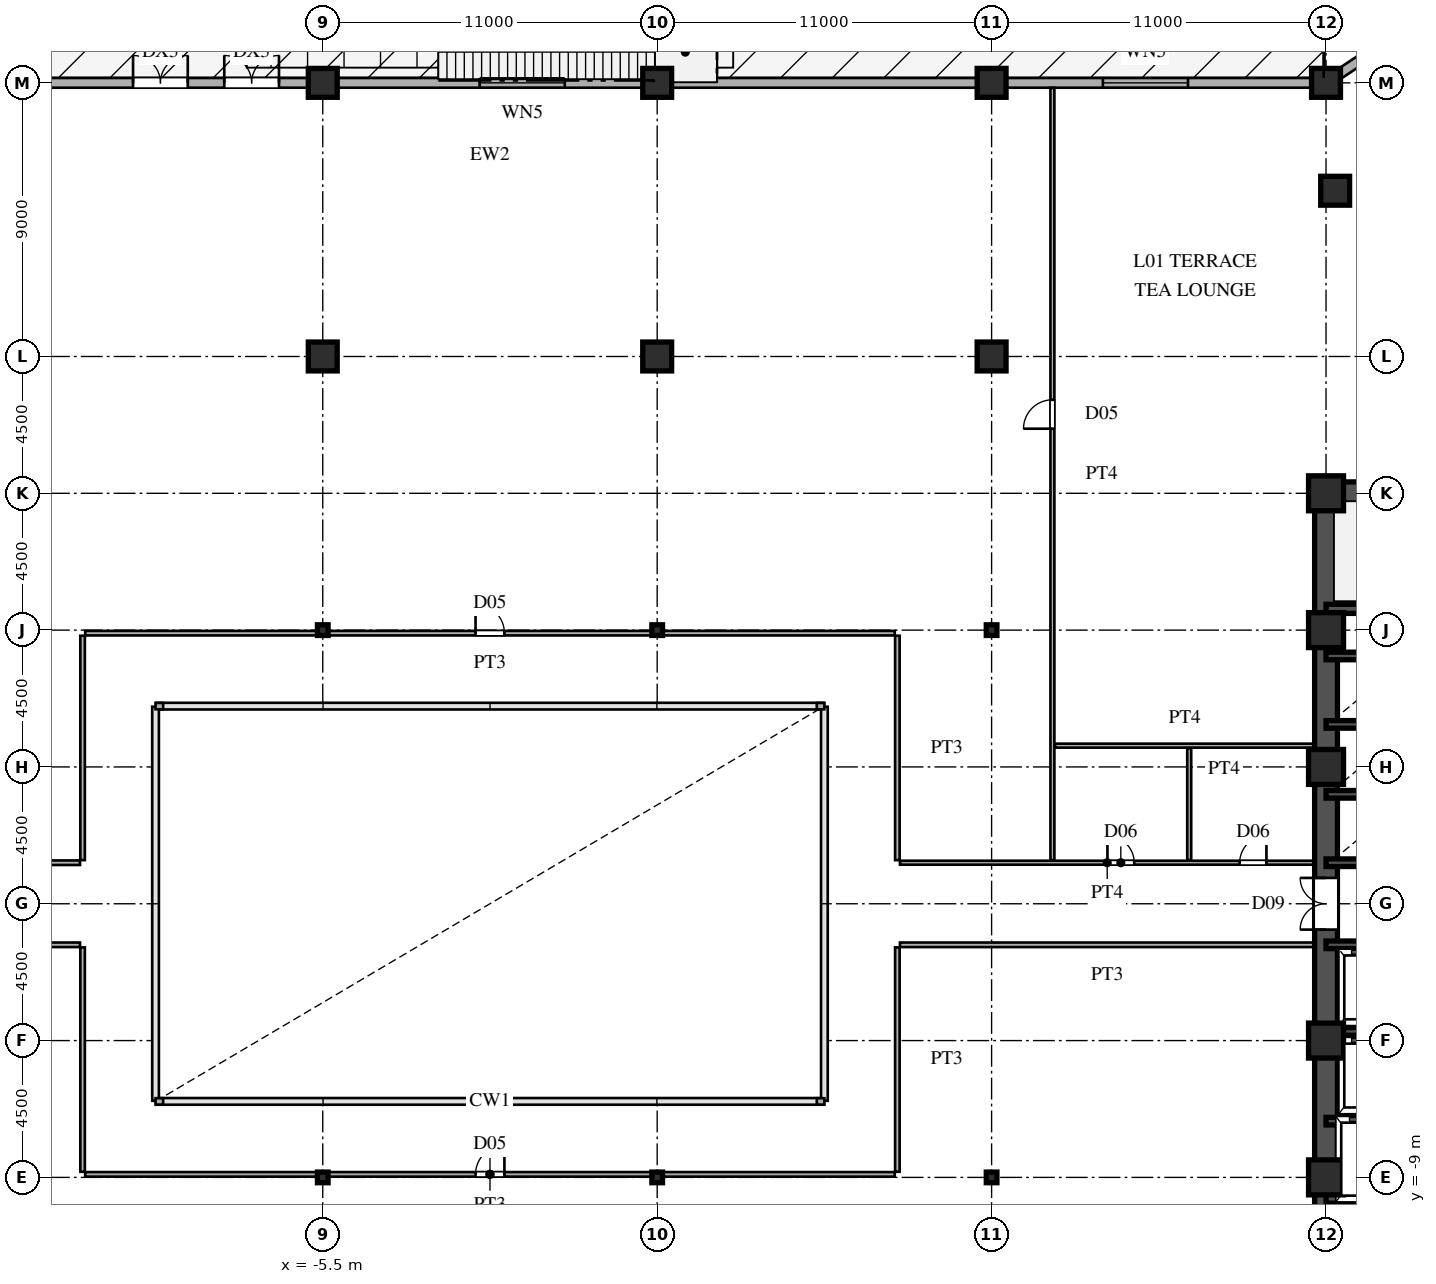
"""IFC4 building model, lengths in metres.
Left out: names, types, materials, properties, quantities, classifications, styles, units other than length and angle.
Written with IfcOpenShell. Run it as: python <this file> out.ifc"""

import sys

from ifc_helpers import new_model, si_unit, direction, frame, frame_2d, origin, origin_2d, place, context, subcontext, project, spatial, rectangle, hollow_rectangle, i_section, extrude, source, transform, mapped, element, fill, save


model = new_model("IFC4")
c1 = context("Model", 3, precision=1e-05, world=origin(), true_north=direction((0.0, 1.0)))
c2 = subcontext(c1, "Body", "Model", "MODEL_VIEW")
j1 = project(units=[si_unit("LENGTHUNIT", "METRE"), si_unit("PLANEANGLEUNIT", "RADIAN")], contexts=[c1])
p1 = place(None, origin())
s1 = spatial("IfcSite", under=j1, at=p1, CompositionType="ELEMENT")
p2 = place(p1, origin())
s2 = spatial("IfcBuilding", under=s1, at=p2, CompositionType="ELEMENT")
p3 = place(p2, frame((0.0, 0.0, 5.4)))
s3 = spatial("IfcBuildingStorey", under=s2, at=p3, CompositionType="ELEMENT", Elevation=5.4)
m1 = source(origin(), c2, "Body", "SweptSolid", [
    extrude(hollow_rectangle(XDim=1.15, YDim=1.15, WallThickness=0.048, at=origin_2d()), origin(), (0.0, 0.0, 1.0), 4.5),
])
for number, where, z_axis, x_axis in (
    (1, (27.5, -9.0, 0.0), (0.0, 0.0, 1.0), (1.0, 0.0, 0.0)),
    (2, (27.5, -4.5, 0.0), (0.0, 0.0, 1.0), (1.0, 0.0, 0.0)),
    (3, (27.5, 4.5, 0.0), (0.0, 0.0, 1.0), (1.0, 0.0, 0.0)),
    (4, (27.5, 9.0, 0.0), (0.0, 0.0, 1.0), (1.0, 0.0, 0.0)),
    (5, (27.5, 13.5, 0.0), (0.0, 0.0, 1.0), (1.0, 0.0, 0.0)),
):
    element("IfcColumn", number, at=place(p3, frame(where, z_axis=z_axis, x_axis=x_axis)), inside=s3, PredefinedType="COLUMN", context=c2, shape_type="MappedRepresentation", body=[
        mapped(m1, transform((0.0, 0.0, 0.0), scale=1.0)),
    ])
m2 = source(origin(), c2, "Body", "SweptSolid", [
    extrude(rectangle(XDim=0.95, YDim=0.95, at=origin_2d()), origin(), (0.0, 0.0, 1.0), 4.5),
])
for number, where, z_axis, x_axis in (
    (6, (27.5, 27.0, 0.0), (0.0, 0.0, 1.0), (1.0, 0.0, 0.0)),
    (7, (27.8, 23.451, 0.0), (0.0, 0.0, 1.0), (1.0, 0.0, 0.0)),
):
    element("IfcColumn", number, at=place(p3, frame(where, z_axis=z_axis, x_axis=x_axis)), inside=s3, PredefinedType="COLUMN", context=c2, shape_type="MappedRepresentation", body=[
        mapped(m2, transform((0.0, 0.0, 0.0), scale=1.0)),
    ])
m3 = source(origin(), c2, "Body", "SweptSolid", [
    extrude(i_section(OverallWidth=0.35, OverallDepth=0.35, WebThickness=0.012, FlangeThickness=0.019, at=origin_2d()), origin(), (0.0, 0.0, 1.0), 4.5),
])
for number, where, z_axis, x_axis in (
    (8, (-5.5, -9.0, 0.0), (0.0, 0.0, 1.0), (1.0, 0.0, 0.0)),
    (9, (-5.5, 9.0, 0.0), (0.0, 0.0, 1.0), (1.0, 0.0, 0.0)),
):
    element("IfcColumn", number, at=place(p3, frame(where, z_axis=z_axis, x_axis=x_axis)), inside=s3, PredefinedType="COLUMN", context=c2, shape_type="MappedRepresentation", body=[
        mapped(m3, transform((0.0, 0.0, 0.0), scale=1.0)),
    ])
for number, where, z_axis, x_axis in (
    (10, (-5.5, 18.0, 0.0), (0.0, 0.0, 1.0), (1.0, 0.0, 0.0)),
    (11, (-5.5, 27.0, 0.0), (0.0, 0.0, 1.0), (1.0, 0.0, 0.0)),
):
    element("IfcColumn", number, at=place(p3, frame(where, z_axis=z_axis, x_axis=x_axis)), inside=s3, PredefinedType="COLUMN", context=c2, shape_type="MappedRepresentation", body=[
        mapped(m2, transform((0.0, 0.0, 0.0), scale=1.0)),
    ])
for number, where, z_axis, x_axis in (
    (12, (5.5, -9.0, 0.0), (0.0, 0.0, 1.0), (1.0, 0.0, 0.0)),
    (13, (5.5, 9.0, 0.0), (0.0, 0.0, 1.0), (1.0, 0.0, 0.0)),
):
    element("IfcColumn", number, at=place(p3, frame(where, z_axis=z_axis, x_axis=x_axis)), inside=s3, PredefinedType="COLUMN", context=c2, shape_type="MappedRepresentation", body=[
        mapped(m3, transform((0.0, 0.0, 0.0), scale=1.0)),
    ])
for number, where, z_axis, x_axis in (
    (14, (5.5, 18.0, 0.0), (0.0, 0.0, 1.0), (1.0, 0.0, 0.0)),
    (15, (5.5, 27.0, 0.0), (0.0, 0.0, 1.0), (1.0, 0.0, 0.0)),
):
    element("IfcColumn", number, at=place(p3, frame(where, z_axis=z_axis, x_axis=x_axis)), inside=s3, PredefinedType="COLUMN", context=c2, shape_type="MappedRepresentation", body=[
        mapped(m2, transform((0.0, 0.0, 0.0), scale=1.0)),
    ])
for number, where, z_axis, x_axis in (
    (16, (16.5, -9.0, 0.0), (0.0, 0.0, 1.0), (1.0, 0.0, 0.0)),
    (17, (16.5, 9.0, 0.0), (0.0, 0.0, 1.0), (1.0, 0.0, 0.0)),
):
    element("IfcColumn", number, at=place(p3, frame(where, z_axis=z_axis, x_axis=x_axis)), inside=s3, PredefinedType="COLUMN", context=c2, shape_type="MappedRepresentation", body=[
        mapped(m3, transform((0.0, 0.0, 0.0), scale=1.0)),
    ])
for number, where, z_axis, x_axis in (
    (18, (16.5, 18.0, 0.0), (0.0, 0.0, 1.0), (1.0, 0.0, 0.0)),
    (19, (16.5, 27.0, 0.0), (0.0, 0.0, 1.0), (1.0, 0.0, 0.0)),
):
    element("IfcColumn", number, at=place(p3, frame(where, z_axis=z_axis, x_axis=x_axis)), inside=s3, PredefinedType="COLUMN", context=c2, shape_type="MappedRepresentation", body=[
        mapped(m2, transform((0.0, 0.0, 0.0), scale=1.0)),
    ])
p4 = place(p3, frame((30.467, 28.978, 0.0), z_axis=(0.0, 0.0, 1.0), x_axis=(-0.832071600484, -0.554668235676, 0.0)))
e20 = element("IfcWall", 20, at=p4, inside=s3, PredefinedType="SOLIDWALL", context=c2, shape_type="SweptSolid", body=[
    extrude(rectangle(XDim=3.526, YDim=0.32, at=frame_2d((1.763, 0.0))), origin(), (0.0, 0.0, 1.0), 4.22),
])
p5 = place(p3, frame((27.46, 27.0, 0.0), z_axis=(0.0, 0.0, 1.0), x_axis=(-1.0, 0.0, 0.0)))
e21 = element("IfcWall", 21, at=p5, inside=s3, PredefinedType="SOLIDWALL", context=c2, shape_type="SweptSolid", body=[
    extrude(rectangle(XDim=54.92, YDim=0.32, at=frame_2d((27.46, 0.0))), origin(), (0.0, 0.0, 1.0), 3.42),
])
p6 = place(p5, frame((34.4, 0.0, 0.0)))
e22 = element("IfcOpeningElement", 22, at=p6, cuts=e21, PredefinedType="OPENING", context=c2, shape_type="SweptSolid", body=[
    extrude(rectangle(XDim=1.8, YDim=2.3, at=frame_2d((0.9, 1.15))), frame((0.0, 0.17, 0.0), z_axis=(0.0, -1.0, 0.0), x_axis=(1.0, 0.0, 0.0)), (0.0, 0.0, 1.0), 0.34),
])
p7 = place(p5, frame((37.4, 0.0, 0.0)))
e23 = element("IfcOpeningElement", 23, at=p7, cuts=e21, PredefinedType="OPENING", context=c2, shape_type="SweptSolid", body=[
    extrude(rectangle(XDim=1.8, YDim=2.3, at=frame_2d((0.9, 1.15))), frame((0.0, 0.17, 0.0), z_axis=(0.0, -1.0, 0.0), x_axis=(1.0, 0.0, 0.0)), (0.0, 0.0, 1.0), 0.34),
])
p8 = place(p5, frame((4.5, 0.0, 0.8)))
e24 = element("IfcOpeningElement", 24, at=p8, cuts=e21, PredefinedType="OPENING", context=c2, shape_type="SweptSolid", body=[
    extrude(rectangle(XDim=2.8, YDim=2.1, at=frame_2d((1.4, 1.05))), frame((0.0, 0.17, 0.0), z_axis=(0.0, -1.0, 0.0), x_axis=(1.0, 0.0, 0.0)), (0.0, 0.0, 1.0), 0.34),
])
p9 = place(p5, frame((25.0, 0.0, 0.8)))
e25 = element("IfcOpeningElement", 25, at=p9, cuts=e21, PredefinedType="OPENING", context=c2, shape_type="SweptSolid", body=[
    extrude(rectangle(XDim=2.8, YDim=2.1, at=frame_2d((1.4, 1.05))), frame((0.0, 0.17, 0.0), z_axis=(0.0, -1.0, 0.0), x_axis=(1.0, 0.0, 0.0)), (0.0, 0.0, 1.0), 0.34),
])
p10 = place(p5, frame((46.42, 0.0, 0.8)))
e26 = element("IfcOpeningElement", 26, at=p10, cuts=e21, PredefinedType="OPENING", context=c2, shape_type="SweptSolid", body=[
    extrude(rectangle(XDim=2.8, YDim=2.1, at=frame_2d((1.4, 1.05))), frame((0.0, 0.17, 0.0), z_axis=(0.0, -1.0, 0.0), x_axis=(1.0, 0.0, 0.0)), (0.0, 0.0, 1.0), 0.34),
])
for number, where, z_axis, x_axis in (
    (27, (-11.0, -6.5, 0.0), (0.0, 0.0, 1.0), (1.0, 0.0, 0.0)),
    (28, (11.0, -6.5, 0.0), (0.0, 0.0, 1.0), (-1.0, 0.0, 0.0)),
    (29, (11.0, 6.5, 0.0), (0.0, 0.0, 1.0), (-1.0, 0.0, 0.0)),
    (30, (-11.0, 6.5, 0.0), (0.0, 0.0, 1.0), (1.0, 0.0, 0.0)),
):
    element("IfcWall", number, at=place(p3, frame(where, z_axis=z_axis, x_axis=x_axis)), inside=s3, PredefinedType="SOLIDWALL", context=c2, shape_type="SweptSolid", body=[
        extrude(rectangle(XDim=0.25, YDim=0.21, at=frame_2d((0.125, 0.0))), origin(), (0.0, 0.0, 1.0), 4.22),
    ])
for number, where, z_axis, x_axis in (
    (31, (27.5, -13.5, 0.0), (0.0, 0.0, 1.0), (0.0, 1.0, 0.0)),
    (32, (27.5, 1.3, 0.0), (0.0, 0.0, 1.0), (0.0, 1.0, 0.0)),
):
    element("IfcWall", number, at=place(p3, frame(where, z_axis=z_axis, x_axis=x_axis)), inside=s3, PredefinedType="SHEAR", context=c2, shape_type="SweptSolid", body=[
        extrude(rectangle(XDim=12.2, YDim=0.75, at=frame_2d((6.1, 0.0))), origin(), (0.0, 0.0, 1.0), 4.22),
    ])
p11 = place(p3, frame((27.5, -1.3, 0.0), z_axis=(0.0, 0.0, 1.0), x_axis=(0.0, 1.0, 0.0)))
e33 = element("IfcWall", 33, at=p11, inside=s3, PredefinedType="SHEAR", context=c2, shape_type="SweptSolid", body=[
    extrude(rectangle(XDim=2.6, YDim=0.75, at=frame_2d((1.3, 0.0))), origin(), (0.0, 0.0, 1.0), 4.22),
])
p12 = place(p11, frame((0.45, 0.0, 0.0)))
e34 = element("IfcOpeningElement", 34, at=p12, cuts=e33, PredefinedType="OPENING", context=c2, shape_type="SweptSolid", body=[
    extrude(rectangle(XDim=1.7, YDim=2.35, at=frame_2d((0.85, 1.175))), frame((0.0, 0.385, 0.0), z_axis=(0.0, -1.0, 0.0), x_axis=(1.0, 0.0, 0.0)), (0.0, 0.0, 1.0), 0.77),
])
p13 = place(p3, frame((27.5, 13.5, 0.0), z_axis=(0.0, 0.0, 1.0), x_axis=(1.0, 0.0, 0.0)))
e35 = element("IfcWall", 35, at=p13, inside=s3, PredefinedType="SHEAR", context=c2, shape_type="SweptSolid", body=[
    extrude(rectangle(XDim=9.0, YDim=0.75, at=frame_2d((4.5, 0.0))), origin(), (0.0, 0.0, 1.0), 4.22),
])
p14 = place(p3, frame((27.5, -9.7, 0.0), z_axis=(0.0, 0.0, 1.0), x_axis=(1.0, 0.0, 0.0)))
e36 = element("IfcWall", 36, at=p14, inside=s3, PredefinedType="SHEAR", context=c2, shape_type="SweptSolid", body=[
    extrude(rectangle(XDim=9.0, YDim=0.3, at=frame_2d((4.5, 0.0))), origin(), (0.0, 0.0, 1.0), 4.22),
])
p15 = place(p14, frame((7.3, 0.0, 0.0)))
e37 = element("IfcOpeningElement", 37, at=p15, cuts=e36, PredefinedType="OPENING", context=c2, shape_type="SweptSolid", body=[
    extrude(rectangle(XDim=1.1, YDim=2.2, at=frame_2d((0.55, 1.1))), frame((0.0, 0.16, 0.0), z_axis=(0.0, -1.0, 0.0), x_axis=(1.0, 0.0, 0.0)), (0.0, 0.0, 1.0), 0.32),
])
p16 = place(p3, frame((27.5, 9.7, 0.0), z_axis=(0.0, 0.0, 1.0), x_axis=(1.0, 0.0, 0.0)))
e38 = element("IfcWall", 38, at=p16, inside=s3, PredefinedType="SHEAR", context=c2, shape_type="SweptSolid", body=[
    extrude(rectangle(XDim=9.0, YDim=0.3, at=frame_2d((4.5, 0.0))), origin(), (0.0, 0.0, 1.0), 4.22),
])
p17 = place(p16, frame((7.3, 0.0, 0.0)))
e39 = element("IfcOpeningElement", 39, at=p17, cuts=e38, PredefinedType="OPENING", context=c2, shape_type="SweptSolid", body=[
    extrude(rectangle(XDim=1.1, YDim=2.2, at=frame_2d((0.55, 1.1))), frame((0.0, 0.16, 0.0), z_axis=(0.0, -1.0, 0.0), x_axis=(1.0, 0.0, 0.0)), (0.0, 0.0, 1.0), 0.32),
])
for number, where, z_axis, x_axis in (
    (40, (27.5, -7.15, 0.0), (0.0, 0.0, 1.0), (1.0, 0.0, 0.0)),
    (41, (27.5, -4.2, 0.0), (0.0, 0.0, 1.0), (1.0, 0.0, 0.0)),
    (42, (27.5, -1.35, 0.0), (0.0, 0.0, 1.0), (1.0, 0.0, 0.0)),
    (43, (27.5, 1.35, 0.0), (0.0, 0.0, 1.0), (1.0, 0.0, 0.0)),
    (44, (27.5, 3.6, 0.0), (0.0, 0.0, 1.0), (1.0, 0.0, 0.0)),
    (45, (27.5, 5.9, 0.0), (0.0, 0.0, 1.0), (1.0, 0.0, 0.0)),
    (46, (27.5, 8.15, 0.0), (0.0, 0.0, 1.0), (1.0, 0.0, 0.0)),
):
    element("IfcWall", number, at=place(p3, frame(where, z_axis=z_axis, x_axis=x_axis)), inside=s3, PredefinedType="SHEAR", context=c2, shape_type="SweptSolid", body=[
        extrude(rectangle(XDim=2.8, YDim=0.25, at=frame_2d((1.4, 0.0))), origin(), (0.0, 0.0, 1.0), 4.22),
    ])
p18 = place(p3, frame((-13.315, -8.9, 0.0), z_axis=(0.0, 0.0, 1.0), x_axis=(1.0, 0.0, 0.0)))
e47 = element("IfcWall", 47, at=p18, inside=s3, PredefinedType="PARTITIONING", context=c2, shape_type="SweptSolid", body=[
    extrude(rectangle(XDim=26.63, YDim=0.15, at=frame_2d((13.315, 0.0))), origin(), (0.0, 0.0, 1.0), 3.42),
])
p19 = place(p18, frame((12.84, 0.0, 0.0)))
e48 = element("IfcOpeningElement", 48, at=p19, cuts=e47, PredefinedType="OPENING", context=c2, shape_type="SweptSolid", body=[
    extrude(rectangle(XDim=0.95, YDim=2.15, at=frame_2d((0.475, 1.075))), frame((0.0, 0.085, 0.0), z_axis=(0.0, -1.0, 0.0), x_axis=(1.0, 0.0, 0.0)), (0.0, 0.0, 1.0), 0.17),
])
for number, where, z_axis, x_axis in (
    (49, (-27.12, -1.35, 0.0), (0.0, 0.0, 1.0), (1.0, 0.0, 0.0)),
    (50, (13.485, -1.35, 0.0), (0.0, 0.0, 1.0), (1.0, 0.0, 0.0)),
    (51, (-27.12, 1.35, 0.0), (0.0, 0.0, 1.0), (1.0, 0.0, 0.0)),
):
    element("IfcWall", number, at=place(p3, frame(where, z_axis=z_axis, x_axis=x_axis)), inside=s3, PredefinedType="PARTITIONING", context=c2, shape_type="SweptSolid", body=[
        extrude(rectangle(XDim=13.635, YDim=0.15, at=frame_2d((6.817, 0.0))), origin(), (0.0, 0.0, 1.0), 4.22),
    ])
p20 = place(p3, frame((13.485, 1.35, 0.0), z_axis=(0.0, 0.0, 1.0), x_axis=(1.0, 0.0, 0.0)))
e52 = element("IfcWall", 52, at=p20, inside=s3, PredefinedType="PARTITIONING", context=c2, shape_type="SweptSolid", body=[
    extrude(rectangle(XDim=13.635, YDim=0.13, at=frame_2d((6.817, 0.0))), origin(), (0.0, 0.0, 1.0), 4.22),
])
p21 = place(p20, frame((6.825, 0.0, 0.0)))
e53 = element("IfcOpeningElement", 53, at=p21, cuts=e52, PredefinedType="OPENING", context=c2, shape_type="SweptSolid", body=[
    extrude(rectangle(XDim=0.88, YDim=2.1, at=frame_2d((0.44, 1.05))), frame((0.0, 0.075, 0.0), z_axis=(0.0, -1.0, 0.0), x_axis=(1.0, 0.0, 0.0)), (0.0, 0.0, 1.0), 0.15),
])
p22 = place(p20, frame((11.175, 0.0, 0.0)))
e54 = element("IfcOpeningElement", 54, at=p22, cuts=e52, PredefinedType="OPENING", context=c2, shape_type="SweptSolid", body=[
    extrude(rectangle(XDim=0.88, YDim=2.1, at=frame_2d((0.44, 1.05))), frame((0.0, 0.075, 0.0), z_axis=(0.0, -1.0, 0.0), x_axis=(1.0, 0.0, 0.0)), (0.0, 0.0, 1.0), 0.15),
])
p23 = place(p3, frame((18.585, 5.2, 0.0), z_axis=(0.0, 0.0, 1.0), x_axis=(1.0, 0.0, 0.0)))
e55 = element("IfcWall", 55, at=p23, inside=s3, PredefinedType="PARTITIONING", context=c2, shape_type="SweptSolid", body=[
    extrude(rectangle(XDim=8.535, YDim=0.13, at=frame_2d((4.268, 0.0))), origin(), (0.0, 0.0, 1.0), 4.22),
])
p24 = place(p3, frame((-13.315, 8.9, 0.0), z_axis=(0.0, 0.0, 1.0), x_axis=(1.0, 0.0, 0.0)))
e56 = element("IfcWall", 56, at=p24, inside=s3, PredefinedType="PARTITIONING", context=c2, shape_type="SweptSolid", body=[
    extrude(rectangle(XDim=26.63, YDim=0.15, at=frame_2d((13.315, 0.0))), origin(), (0.0, 0.0, 1.0), 3.42),
])
p25 = place(p24, frame((12.84, 0.0, 0.0)))
e57 = element("IfcOpeningElement", 57, at=p25, cuts=e56, PredefinedType="OPENING", context=c2, shape_type="SweptSolid", body=[
    extrude(rectangle(XDim=0.95, YDim=2.15, at=frame_2d((0.475, 1.075))), frame((0.0, 0.085, 0.0), z_axis=(0.0, -1.0, 0.0), x_axis=(1.0, 0.0, 0.0)), (0.0, 0.0, 1.0), 0.17),
])
for number, where, z_axis, x_axis in (
    (58, (-13.4, -8.815, 0.0), (0.0, 0.0, 1.0), (0.0, 1.0, 0.0)),
    (59, (-13.4, 1.435, 0.0), (0.0, 0.0, 1.0), (0.0, 1.0, 0.0)),
    (60, (13.4, -8.815, 0.0), (0.0, 0.0, 1.0), (0.0, 1.0, 0.0)),
    (61, (13.4, 1.435, 0.0), (0.0, 0.0, 1.0), (0.0, 1.0, 0.0)),
):
    element("IfcWall", number, at=place(p3, frame(where, z_axis=z_axis, x_axis=x_axis)), inside=s3, PredefinedType="PARTITIONING", context=c2, shape_type="SweptSolid", body=[
        extrude(rectangle(XDim=7.38, YDim=0.15, at=frame_2d((3.69, 0.0))), origin(), (0.0, 0.0, 1.0), 4.22),
    ])
p26 = place(p3, frame((18.5, 1.435, 0.0), z_axis=(0.0, 0.0, 1.0), x_axis=(0.0, 1.0, 0.0)))
e62 = element("IfcWall", 62, at=p26, inside=s3, PredefinedType="PARTITIONING", context=c2, shape_type="SweptSolid", body=[
    extrude(rectangle(XDim=25.4, YDim=0.13, at=frame_2d((12.7, 0.0))), origin(), (0.0, 0.0, 1.0), 4.22),
])
p27 = place(p26, frame((14.19, 0.0, 0.0)))
e63 = element("IfcOpeningElement", 63, at=p27, cuts=e62, PredefinedType="OPENING", context=c2, shape_type="SweptSolid", body=[
    extrude(rectangle(XDim=0.95, YDim=2.15, at=frame_2d((0.475, 1.075))), frame((0.0, 0.075, 0.0), z_axis=(0.0, -1.0, 0.0), x_axis=(1.0, 0.0, 0.0)), (0.0, 0.0, 1.0), 0.15),
])
p28 = place(p3, frame((23.0, 1.435, 0.0), z_axis=(0.0, 0.0, 1.0), x_axis=(0.0, 1.0, 0.0)))
e64 = element("IfcWall", 64, at=p28, inside=s3, PredefinedType="PARTITIONING", context=c2, shape_type="SweptSolid", body=[
    extrude(rectangle(XDim=3.68, YDim=0.13, at=frame_2d((1.84, 0.0))), origin(), (0.0, 0.0, 1.0), 4.22),
])
m4 = source(origin(), c2, "Body", "SweptSolid", [
    extrude(rectangle(XDim=1.8, YDim=2.3, at=frame_2d((0.9, 1.15))), frame((0.0, 0.025, 0.0), z_axis=(0.0, -1.0, 0.0), x_axis=(1.0, 0.0, 0.0)), (0.0, 0.0, 1.0), 0.05),
])
p29 = place(p6, frame((1.8, 0.0, 0.0), z_axis=(0.0, 0.0, 1.0), x_axis=(-1.0, 0.0, 0.0)))
e65 = element("IfcDoor", 65, at=p29, inside=s3, OperationType="DOUBLE_SWING_LEFT", PredefinedType="DOOR", context=c2, shape_type="MappedRepresentation", body=[
    mapped(m4, transform((0.0, 0.0, 0.0), scale=1.0)),
])
fill(e22, e65)
p30 = place(p7, frame((1.8, 0.0, 0.0), z_axis=(0.0, 0.0, 1.0), x_axis=(-1.0, 0.0, 0.0)))
e66 = element("IfcDoor", 66, at=p30, inside=s3, OperationType="DOUBLE_SWING_LEFT", PredefinedType="DOOR", context=c2, shape_type="MappedRepresentation", body=[
    mapped(m4, transform((0.0, 0.0, 0.0), scale=1.0)),
])
fill(e23, e66)
m5 = source(origin(), c2, "Body", "SweptSolid", [
    extrude(rectangle(XDim=2.8, YDim=2.1, at=frame_2d((1.4, 1.05))), frame((0.0, 0.03, 0.0), z_axis=(0.0, -1.0, 0.0), x_axis=(1.0, 0.0, 0.0)), (0.0, 0.0, 1.0), 0.06),
])
p31 = place(p8, origin())
e67 = element("IfcWindow", 67, at=p31, inside=s3, PartitioningType="SINGLE_PANEL", PredefinedType="WINDOW", context=c2, shape_type="MappedRepresentation", body=[
    mapped(m5, transform((0.0, 0.0, 0.0), scale=1.0)),
])
fill(e24, e67)
p32 = place(p9, origin())
e68 = element("IfcWindow", 68, at=p32, inside=s3, PartitioningType="SINGLE_PANEL", PredefinedType="WINDOW", context=c2, shape_type="MappedRepresentation", body=[
    mapped(m5, transform((0.0, 0.0, 0.0), scale=1.0)),
])
fill(e25, e68)
m6 = source(origin(), c2, "Body", "SweptSolid", [
    extrude(rectangle(XDim=1.7, YDim=2.35, at=frame_2d((0.85, 1.175))), frame((0.0, 0.025, 0.0), z_axis=(0.0, -1.0, 0.0), x_axis=(1.0, 0.0, 0.0)), (0.0, 0.0, 1.0), 0.05),
])
p33 = place(p12, origin())
e69 = element("IfcDoor", 69, at=p33, inside=s3, OperationType="DOUBLE_SWING_LEFT", PredefinedType="DOOR", context=c2, shape_type="MappedRepresentation", body=[
    mapped(m6, transform((0.0, 0.0, 0.0), scale=1.0)),
])
fill(e34, e69)
m7 = source(origin(), c2, "Body", "SweptSolid", [
    extrude(rectangle(XDim=0.95, YDim=2.15, at=frame_2d((0.475, 1.075))), frame((0.0, 0.025, 0.0), z_axis=(0.0, -1.0, 0.0), x_axis=(1.0, 0.0, 0.0)), (0.0, 0.0, 1.0), 0.05),
])
p34 = place(p19, origin())
e70 = element("IfcDoor", 70, at=p34, inside=s3, OperationType="SINGLE_SWING_RIGHT", PredefinedType="DOOR", context=c2, shape_type="MappedRepresentation", body=[
    mapped(m7, transform((0.0, 0.0, 0.0), scale=1.0)),
])
fill(e48, e70)
m8 = source(origin(), c2, "Body", "SweptSolid", [
    extrude(rectangle(XDim=0.88, YDim=2.1, at=frame_2d((0.44, 1.05))), frame((0.0, 0.025, 0.0), z_axis=(0.0, -1.0, 0.0), x_axis=(1.0, 0.0, 0.0)), (0.0, 0.0, 1.0), 0.05),
])
p35 = place(p21, origin())
e71 = element("IfcDoor", 71, at=p35, inside=s3, OperationType="SINGLE_SWING_LEFT", PredefinedType="DOOR", context=c2, shape_type="MappedRepresentation", body=[
    mapped(m8, transform((0.0, 0.0, 0.0), scale=1.0)),
])
fill(e53, e71)
p36 = place(p22, origin())
e72 = element("IfcDoor", 72, at=p36, inside=s3, OperationType="SINGLE_SWING_RIGHT", PredefinedType="DOOR", context=c2, shape_type="MappedRepresentation", body=[
    mapped(m8, transform((0.0, 0.0, 0.0), scale=1.0)),
])
fill(e54, e72)
p37 = place(p25, origin())
e73 = element("IfcDoor", 73, at=p37, inside=s3, OperationType="SINGLE_SWING_LEFT", PredefinedType="DOOR", context=c2, shape_type="MappedRepresentation", body=[
    mapped(m7, transform((0.0, 0.0, 0.0), scale=1.0)),
])
fill(e57, e73)
p38 = place(p27, origin())
e74 = element("IfcDoor", 74, at=p38, inside=s3, OperationType="SINGLE_SWING_LEFT", PredefinedType="DOOR", context=c2, shape_type="MappedRepresentation", body=[
    mapped(m7, transform((0.0, 0.0, 0.0), scale=1.0)),
])
fill(e63, e74)
save(model, sys.argv[1])
